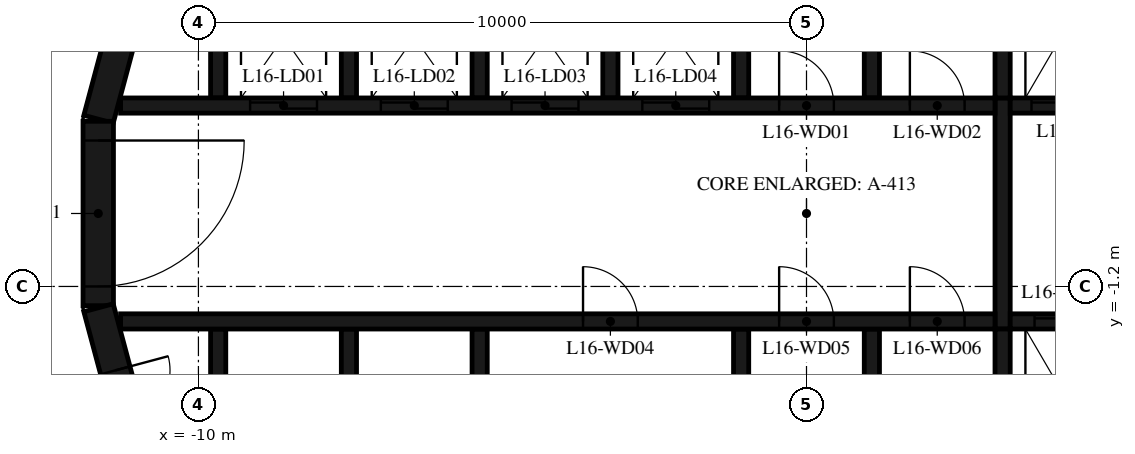
"""IFC4 building model, lengths in metres.
Left out: names, types, materials, properties, quantities, classifications, styles, units other than length and angle.
Written with IfcOpenShell. Run it as: python <this file> out.ifc"""

import sys

from ifc_helpers import new_model, si_unit, direction, frame, frame_2d, origin, place, context, subcontext, project, spatial, polyline, rectangle, outline, extrude, element, fill, save


model = new_model("IFC4")
c1 = context("Model", 3, precision=1e-05, world=origin(), true_north=direction((0.0, 1.0)))
c2 = subcontext(c1, "Body", "Model", "MODEL_VIEW")
j1 = project(units=[si_unit("LENGTHUNIT", "METRE"), si_unit("PLANEANGLEUNIT", "RADIAN")], contexts=[c1])
p1 = place(None, origin())
s1 = spatial("IfcSite", under=j1, at=p1, CompositionType="ELEMENT")
p2 = place(p1, origin())
s2 = spatial("IfcBuilding", under=s1, at=p2, CompositionType="ELEMENT")
p3 = place(p2, frame((0.0, 0.0, 69.9)))
s3 = spatial("IfcBuildingStorey", under=s2, at=p3, CompositionType="ELEMENT", Elevation=69.9)
p4 = place(p3, frame((-10.858, 4.479, 0.0), z_axis=(0.0, 0.0, 1.0), x_axis=(-0.258734743916, -0.965948410781, 0.0)))
e1 = element("IfcWall", 1, at=p4, inside=s3, PredefinedType="SHEAR", context=c2, shape_type="SweptSolid", body=[
    extrude(rectangle(XDim=3.033, YDim=0.5, at=frame_2d((1.516, 0.0))), origin(), (0.0, 0.0, 1.0), 6.35),
])
p5 = place(p3, frame((-11.647, 1.516, 0.0), z_axis=(0.0, 0.0, 1.0), x_axis=(0.0, -1.0, 0.0)))
e2 = element("IfcWall", 2, at=p5, inside=s3, PredefinedType="SHEAR", context=c2, shape_type="SweptSolid", body=[
    extrude(rectangle(XDim=3.033, YDim=0.5, at=frame_2d((1.516, 0.0))), origin(), (0.0, 0.0, 1.0), 6.35),
])
p6 = place(p5, frame((0.316, 0.0, 0.0)))
e3 = element("IfcOpeningElement", 3, at=p6, cuts=e2, PredefinedType="OPENING", context=c2, shape_type="SweptSolid", body=[
    extrude(rectangle(XDim=2.4, YDim=2.1, at=frame_2d((1.2, 1.05))), frame((0.0, 0.26, 0.0), z_axis=(0.0, -1.0, 0.0), x_axis=(1.0, 0.0, 0.0)), (0.0, 0.0, 1.0), 0.52),
])
p7 = place(p3, frame((-11.643, -1.55, 0.0), z_axis=(0.0, 0.0, 1.0), x_axis=(0.258734743916, -0.965948410781, 0.0)))
e4 = element("IfcWall", 4, at=p7, inside=s3, PredefinedType="SHEAR", context=c2, shape_type="SweptSolid", body=[
    extrude(rectangle(XDim=3.033, YDim=0.5, at=frame_2d((1.516, 0.0))), origin(), (0.0, 0.0, 1.0), 6.35),
])
p8 = place(p7, frame((1.066, 0.0, 0.0)))
e5 = element("IfcOpeningElement", 5, at=p8, cuts=e4, PredefinedType="OPENING", context=c2, shape_type="SweptSolid", body=[
    extrude(rectangle(XDim=0.9, YDim=2.1, at=frame_2d((0.45, 1.05))), frame((0.0, 0.26, 0.0), z_axis=(0.0, -1.0, 0.0), x_axis=(1.0, 0.0, 0.0)), (0.0, 0.0, 1.0), 0.52),
])
p9 = place(p3, origin())
e6 = element("IfcWall", 6, at=p9, inside=s3, PredefinedType="SHEAR", context=c2, shape_type="SweptSolid", body=[
    extrude(outline(polyline([(-9.55, 4.8), (-7.65, 4.8), (-7.65, 1.9), (-7.4, 1.9), (-7.4, 4.8), (-5.5, 4.8), (-5.5, 1.9), (-5.25, 1.9), (-5.25, 4.8), (-3.35, 4.8), (-3.35, 1.9), (-3.1, 1.9), (-3.1, 4.8), (-1.2, 4.8), (-1.2, 1.9), (-0.95, 1.9), (-0.95, 4.8), (0.95, 4.8), (0.95, 1.9), (1.2, 1.9), (1.2, 4.8), (3.1, 4.8), (3.1, 1.9), (3.35, 1.9), (3.35, 4.8), (5.25, 4.8), (5.25, 1.9), (5.5, 1.9), (5.5, 4.8), (7.4, 4.8), (7.4, 1.9), (7.65, 1.9), (7.65, 4.8), (9.55, 4.8), (9.55, 1.9), (9.8, 1.9), (9.8, 4.8), (9.8, 5.05), (-9.8, 5.05), (-9.8, 4.8), (-9.8, 1.9), (-9.55, 1.9), (-9.55, 4.8)])), origin(), (0.0, 0.0, 1.0), 6.35),
])
p10 = place(p3, origin())
e7 = element("IfcWall", 7, at=p10, inside=s3, PredefinedType="SHEAR", context=c2, shape_type="SweptSolid", body=[
    extrude(outline(polyline([(9.8, -5.05), (9.8, -4.8), (9.8, -1.9), (9.55, -1.9), (9.55, -4.8), (7.65, -4.8), (7.65, -1.9), (7.4, -1.9), (7.4, -4.8), (5.5, -4.8), (5.5, -1.9), (5.25, -1.9), (5.25, -4.8), (3.35, -4.8), (3.35, -1.9), (3.1, -1.9), (3.1, -4.8), (1.2, -4.8), (1.2, -1.9), (0.95, -1.9), (0.95, -4.8), (-0.95, -4.8), (-0.95, -1.9), (-1.2, -1.9), (-1.2, -4.8), (-5.25, -4.8), (-5.25, -1.9), (-5.5, -1.9), (-5.5, -4.8), (-7.4, -4.8), (-7.4, -1.9), (-7.65, -1.9), (-7.65, -4.8), (-9.55, -4.8), (-9.55, -1.9), (-9.8, -1.9), (-9.8, -4.8), (-9.8, -5.05), (9.8, -5.05)])), origin(), (0.0, 0.0, 1.0), 6.35),
])
p11 = place(p3, frame((-11.28, 1.775, 0.0), z_axis=(0.0, 0.0, 1.0), x_axis=(1.0, 0.0, 0.0)))
e8 = element("IfcWall", 8, at=p11, inside=s3, PredefinedType="SHEAR", context=c2, shape_type="SweptSolid", body=[
    extrude(rectangle(XDim=14.38, YDim=0.25, at=frame_2d((7.19, 0.0))), origin(), (0.0, 0.0, 1.0), 6.35),
])
p12 = place(p11, frame((2.13, 0.0, 0.0)))
e9 = element("IfcOpeningElement", 9, at=p12, cuts=e8, PredefinedType="OPENING", context=c2, shape_type="SweptSolid", body=[
    extrude(rectangle(XDim=1.1, YDim=2.1, at=frame_2d((0.55, 1.05))), frame((0.0, 0.135, 0.0), z_axis=(0.0, -1.0, 0.0), x_axis=(1.0, 0.0, 0.0)), (0.0, 0.0, 1.0), 0.27),
])
p13 = place(p11, frame((4.28, 0.0, 0.0)))
e10 = element("IfcOpeningElement", 10, at=p13, cuts=e8, PredefinedType="OPENING", context=c2, shape_type="SweptSolid", body=[
    extrude(rectangle(XDim=1.1, YDim=2.1, at=frame_2d((0.55, 1.05))), frame((0.0, 0.135, 0.0), z_axis=(0.0, -1.0, 0.0), x_axis=(1.0, 0.0, 0.0)), (0.0, 0.0, 1.0), 0.27),
])
p14 = place(p11, frame((6.43, 0.0, 0.0)))
e11 = element("IfcOpeningElement", 11, at=p14, cuts=e8, PredefinedType="OPENING", context=c2, shape_type="SweptSolid", body=[
    extrude(rectangle(XDim=1.1, YDim=2.1, at=frame_2d((0.55, 1.05))), frame((0.0, 0.135, 0.0), z_axis=(0.0, -1.0, 0.0), x_axis=(1.0, 0.0, 0.0)), (0.0, 0.0, 1.0), 0.27),
])
p15 = place(p11, frame((8.58, 0.0, 0.0)))
e12 = element("IfcOpeningElement", 12, at=p15, cuts=e8, PredefinedType="OPENING", context=c2, shape_type="SweptSolid", body=[
    extrude(rectangle(XDim=1.1, YDim=2.1, at=frame_2d((0.55, 1.05))), frame((0.0, 0.135, 0.0), z_axis=(0.0, -1.0, 0.0), x_axis=(1.0, 0.0, 0.0)), (0.0, 0.0, 1.0), 0.27),
])
p16 = place(p11, frame((10.83, 0.0, 0.0)))
e13 = element("IfcOpeningElement", 13, at=p16, cuts=e8, PredefinedType="OPENING", context=c2, shape_type="SweptSolid", body=[
    extrude(rectangle(XDim=0.9, YDim=2.1, at=frame_2d((0.45, 1.05))), frame((0.0, 0.135, 0.0), z_axis=(0.0, -1.0, 0.0), x_axis=(1.0, 0.0, 0.0)), (0.0, 0.0, 1.0), 0.27),
])
p17 = place(p11, frame((12.98, 0.0, 0.0)))
e14 = element("IfcOpeningElement", 14, at=p17, cuts=e8, PredefinedType="OPENING", context=c2, shape_type="SweptSolid", body=[
    extrude(rectangle(XDim=0.9, YDim=2.1, at=frame_2d((0.45, 1.05))), frame((0.0, 0.135, 0.0), z_axis=(0.0, -1.0, 0.0), x_axis=(1.0, 0.0, 0.0)), (0.0, 0.0, 1.0), 0.27),
])
p18 = place(p3, frame((3.35, 1.775, 0.0), z_axis=(0.0, 0.0, 1.0), x_axis=(1.0, 0.0, 0.0)))
e15 = element("IfcWall", 15, at=p18, inside=s3, PredefinedType="SHEAR", context=c2, shape_type="SweptSolid", body=[
    extrude(rectangle(XDim=7.93, YDim=0.25, at=frame_2d((3.965, 0.0))), origin(), (0.0, 0.0, 1.0), 6.35),
])
p19 = place(p18, frame((0.35, 0.0, 0.0)))
e16 = element("IfcOpeningElement", 16, at=p19, cuts=e15, PredefinedType="OPENING", context=c2, shape_type="SweptSolid", body=[
    extrude(rectangle(XDim=1.2, YDim=2.4, at=frame_2d((0.6, 1.2))), frame((0.0, 0.135, 0.0), z_axis=(0.0, -1.0, 0.0), x_axis=(1.0, 0.0, 0.0)), (0.0, 0.0, 1.0), 0.27),
])
p20 = place(p18, frame((2.5, 0.0, 0.0)))
e17 = element("IfcOpeningElement", 17, at=p20, cuts=e15, PredefinedType="OPENING", context=c2, shape_type="SweptSolid", body=[
    extrude(rectangle(XDim=1.2, YDim=2.4, at=frame_2d((0.6, 1.2))), frame((0.0, 0.135, 0.0), z_axis=(0.0, -1.0, 0.0), x_axis=(1.0, 0.0, 0.0)), (0.0, 0.0, 1.0), 0.27),
])
p21 = place(p18, frame((4.8, 0.0, 0.0)))
e18 = element("IfcOpeningElement", 18, at=p21, cuts=e15, PredefinedType="OPENING", context=c2, shape_type="SweptSolid", body=[
    extrude(rectangle(XDim=0.9, YDim=2.1, at=frame_2d((0.45, 1.05))), frame((0.0, 0.135, 0.0), z_axis=(0.0, -1.0, 0.0), x_axis=(1.0, 0.0, 0.0)), (0.0, 0.0, 1.0), 0.27),
])
p22 = place(p3, frame((-11.28, -1.775, 0.0), z_axis=(0.0, 0.0, 1.0), x_axis=(1.0, 0.0, 0.0)))
e19 = element("IfcWall", 19, at=p22, inside=s3, PredefinedType="SHEAR", context=c2, shape_type="SweptSolid", body=[
    extrude(rectangle(XDim=14.38, YDim=0.25, at=frame_2d((7.19, 0.0))), origin(), (0.0, 0.0, 1.0), 6.35),
])
p23 = place(p22, frame((7.605, 0.0, 0.0)))
e20 = element("IfcOpeningElement", 20, at=p23, cuts=e19, PredefinedType="OPENING", context=c2, shape_type="SweptSolid", body=[
    extrude(rectangle(XDim=0.9, YDim=2.1, at=frame_2d((0.45, 1.05))), frame((0.0, 0.135, 0.0), z_axis=(0.0, -1.0, 0.0), x_axis=(1.0, 0.0, 0.0)), (0.0, 0.0, 1.0), 0.27),
])
p24 = place(p22, frame((10.83, 0.0, 0.0)))
e21 = element("IfcOpeningElement", 21, at=p24, cuts=e19, PredefinedType="OPENING", context=c2, shape_type="SweptSolid", body=[
    extrude(rectangle(XDim=0.9, YDim=2.1, at=frame_2d((0.45, 1.05))), frame((0.0, 0.135, 0.0), z_axis=(0.0, -1.0, 0.0), x_axis=(1.0, 0.0, 0.0)), (0.0, 0.0, 1.0), 0.27),
])
p25 = place(p22, frame((12.98, 0.0, 0.0)))
e22 = element("IfcOpeningElement", 22, at=p25, cuts=e19, PredefinedType="OPENING", context=c2, shape_type="SweptSolid", body=[
    extrude(rectangle(XDim=0.9, YDim=2.1, at=frame_2d((0.45, 1.05))), frame((0.0, 0.135, 0.0), z_axis=(0.0, -1.0, 0.0), x_axis=(1.0, 0.0, 0.0)), (0.0, 0.0, 1.0), 0.27),
])
p26 = place(p3, frame((3.35, -1.775, 0.0), z_axis=(0.0, 0.0, 1.0), x_axis=(1.0, 0.0, 0.0)))
e23 = element("IfcWall", 23, at=p26, inside=s3, PredefinedType="SHEAR", context=c2, shape_type="SweptSolid", body=[
    extrude(rectangle(XDim=7.93, YDim=0.25, at=frame_2d((3.965, 0.0))), origin(), (0.0, 0.0, 1.0), 6.35),
])
p27 = place(p26, frame((0.4, 0.0, 0.0)))
e24 = element("IfcOpeningElement", 24, at=p27, cuts=e23, PredefinedType="OPENING", context=c2, shape_type="SweptSolid", body=[
    extrude(rectangle(XDim=1.1, YDim=2.4, at=frame_2d((0.55, 1.2))), frame((0.0, 0.135, 0.0), z_axis=(0.0, -1.0, 0.0), x_axis=(1.0, 0.0, 0.0)), (0.0, 0.0, 1.0), 0.27),
])
p28 = place(p26, frame((2.55, 0.0, 0.0)))
e25 = element("IfcOpeningElement", 25, at=p28, cuts=e23, PredefinedType="OPENING", context=c2, shape_type="SweptSolid", body=[
    extrude(rectangle(XDim=1.1, YDim=2.4, at=frame_2d((0.55, 1.2))), frame((0.0, 0.135, 0.0), z_axis=(0.0, -1.0, 0.0), x_axis=(1.0, 0.0, 0.0)), (0.0, 0.0, 1.0), 0.27),
])
p29 = place(p26, frame((4.7, 0.0, 0.0)))
e26 = element("IfcOpeningElement", 26, at=p29, cuts=e23, PredefinedType="OPENING", context=c2, shape_type="SweptSolid", body=[
    extrude(rectangle(XDim=1.1, YDim=2.4, at=frame_2d((0.55, 1.2))), frame((0.0, 0.135, 0.0), z_axis=(0.0, -1.0, 0.0), x_axis=(1.0, 0.0, 0.0)), (0.0, 0.0, 1.0), 0.27),
])
p30 = place(p3, frame((3.225, -1.9, 0.0), z_axis=(0.0, 0.0, 1.0), x_axis=(0.0, 1.0, 0.0)))
e27 = element("IfcWall", 27, at=p30, inside=s3, PredefinedType="SHEAR", context=c2, shape_type="SweptSolid", body=[
    extrude(rectangle(XDim=3.8, YDim=0.25, at=frame_2d((1.9, 0.0))), origin(), (0.0, 0.0, 1.0), 6.35),
])
p31 = place(p6, origin())
e28 = element("IfcDoor", 28, at=p31, inside=s3, OperationType="DOUBLE_DOOR_SINGLE_SWING", PredefinedType="DOOR", context=c2, shape_type="SweptSolid", body=[
    extrude(rectangle(XDim=2.4, YDim=2.1, at=frame_2d((1.2, 1.05))), frame((0.0, 0.025, 0.0), z_axis=(0.0, -1.0, 0.0), x_axis=(1.0, 0.0, 0.0)), (0.0, 0.0, 1.0), 0.05),
])
fill(e3, e28)
p32 = place(p12, origin())
e29 = element("IfcDoor", 29, at=p32, inside=s3, OperationType="DOUBLE_DOOR_SLIDING", PredefinedType="DOOR", context=c2, shape_type="SweptSolid", body=[
    extrude(rectangle(XDim=1.1, YDim=2.1, at=frame_2d((0.55, 1.05))), frame((0.0, 0.025, 0.0), z_axis=(0.0, -1.0, 0.0), x_axis=(1.0, 0.0, 0.0)), (0.0, 0.0, 1.0), 0.05),
])
fill(e9, e29)
p33 = place(p13, origin())
e30 = element("IfcDoor", 30, at=p33, inside=s3, OperationType="DOUBLE_DOOR_SLIDING", PredefinedType="DOOR", context=c2, shape_type="SweptSolid", body=[
    extrude(rectangle(XDim=1.1, YDim=2.1, at=frame_2d((0.55, 1.05))), frame((0.0, 0.025, 0.0), z_axis=(0.0, -1.0, 0.0), x_axis=(1.0, 0.0, 0.0)), (0.0, 0.0, 1.0), 0.05),
])
fill(e10, e30)
p34 = place(p14, origin())
e31 = element("IfcDoor", 31, at=p34, inside=s3, OperationType="DOUBLE_DOOR_SLIDING", PredefinedType="DOOR", context=c2, shape_type="SweptSolid", body=[
    extrude(rectangle(XDim=1.1, YDim=2.1, at=frame_2d((0.55, 1.05))), frame((0.0, 0.025, 0.0), z_axis=(0.0, -1.0, 0.0), x_axis=(1.0, 0.0, 0.0)), (0.0, 0.0, 1.0), 0.05),
])
fill(e11, e31)
p35 = place(p15, origin())
e32 = element("IfcDoor", 32, at=p35, inside=s3, OperationType="DOUBLE_DOOR_SLIDING", PredefinedType="DOOR", context=c2, shape_type="SweptSolid", body=[
    extrude(rectangle(XDim=1.1, YDim=2.1, at=frame_2d((0.55, 1.05))), frame((0.0, 0.025, 0.0), z_axis=(0.0, -1.0, 0.0), x_axis=(1.0, 0.0, 0.0)), (0.0, 0.0, 1.0), 0.05),
])
fill(e12, e32)
p36 = place(p19, origin())
e33 = element("IfcDoor", 33, at=p36, inside=s3, OperationType="DOUBLE_DOOR_SLIDING", PredefinedType="DOOR", context=c2, shape_type="SweptSolid", body=[
    extrude(rectangle(XDim=1.2, YDim=2.4, at=frame_2d((0.6, 1.2))), frame((0.0, 0.025, 0.0), z_axis=(0.0, -1.0, 0.0), x_axis=(1.0, 0.0, 0.0)), (0.0, 0.0, 1.0), 0.05),
])
fill(e16, e33)
p37 = place(p27, origin())
e34 = element("IfcDoor", 34, at=p37, inside=s3, OperationType="DOUBLE_DOOR_SLIDING", PredefinedType="DOOR", context=c2, shape_type="SweptSolid", body=[
    extrude(rectangle(XDim=1.1, YDim=2.4, at=frame_2d((0.55, 1.2))), frame((0.0, 0.025, 0.0), z_axis=(0.0, -1.0, 0.0), x_axis=(1.0, 0.0, 0.0)), (0.0, 0.0, 1.0), 0.05),
])
fill(e24, e34)
p38 = place(p16, origin())
e35 = element("IfcDoor", 35, at=p38, inside=s3, OperationType="SINGLE_SWING_RIGHT", PredefinedType="DOOR", context=c2, shape_type="SweptSolid", body=[
    extrude(rectangle(XDim=0.9, YDim=2.1, at=frame_2d((0.45, 1.05))), frame((0.0, 0.025, 0.0), z_axis=(0.0, -1.0, 0.0), x_axis=(1.0, 0.0, 0.0)), (0.0, 0.0, 1.0), 0.05),
])
fill(e13, e35)
p39 = place(p17, origin())
e36 = element("IfcDoor", 36, at=p39, inside=s3, OperationType="SINGLE_SWING_LEFT", PredefinedType="DOOR", context=c2, shape_type="SweptSolid", body=[
    extrude(rectangle(XDim=0.9, YDim=2.1, at=frame_2d((0.45, 1.05))), frame((0.0, 0.025, 0.0), z_axis=(0.0, -1.0, 0.0), x_axis=(1.0, 0.0, 0.0)), (0.0, 0.0, 1.0), 0.05),
])
fill(e14, e36)
p40 = place(p23, origin())
e37 = element("IfcDoor", 37, at=p40, inside=s3, OperationType="SINGLE_SWING_LEFT", PredefinedType="DOOR", context=c2, shape_type="SweptSolid", body=[
    extrude(rectangle(XDim=0.9, YDim=2.1, at=frame_2d((0.45, 1.05))), frame((0.0, 0.025, 0.0), z_axis=(0.0, -1.0, 0.0), x_axis=(1.0, 0.0, 0.0)), (0.0, 0.0, 1.0), 0.05),
])
fill(e20, e37)
p41 = place(p24, origin())
e38 = element("IfcDoor", 38, at=p41, inside=s3, OperationType="SINGLE_SWING_RIGHT", PredefinedType="DOOR", context=c2, shape_type="SweptSolid", body=[
    extrude(rectangle(XDim=0.9, YDim=2.1, at=frame_2d((0.45, 1.05))), frame((0.0, 0.025, 0.0), z_axis=(0.0, -1.0, 0.0), x_axis=(1.0, 0.0, 0.0)), (0.0, 0.0, 1.0), 0.05),
])
fill(e21, e38)
p42 = place(p25, origin())
e39 = element("IfcDoor", 39, at=p42, inside=s3, OperationType="SINGLE_SWING_LEFT", PredefinedType="DOOR", context=c2, shape_type="SweptSolid", body=[
    extrude(rectangle(XDim=0.9, YDim=2.1, at=frame_2d((0.45, 1.05))), frame((0.0, 0.025, 0.0), z_axis=(0.0, -1.0, 0.0), x_axis=(1.0, 0.0, 0.0)), (0.0, 0.0, 1.0), 0.05),
])
fill(e22, e39)
p43 = place(p8, origin())
e40 = element("IfcDoor", 40, at=p43, inside=s3, OperationType="SINGLE_SWING_RIGHT", PredefinedType="DOOR", context=c2, shape_type="SweptSolid", body=[
    extrude(rectangle(XDim=0.9, YDim=2.1, at=frame_2d((0.45, 1.05))), frame((0.0, 0.025, 0.0), z_axis=(0.0, -1.0, 0.0), x_axis=(1.0, 0.0, 0.0)), (0.0, 0.0, 1.0), 0.05),
])
fill(e5, e40)
save(model, sys.argv[1])
